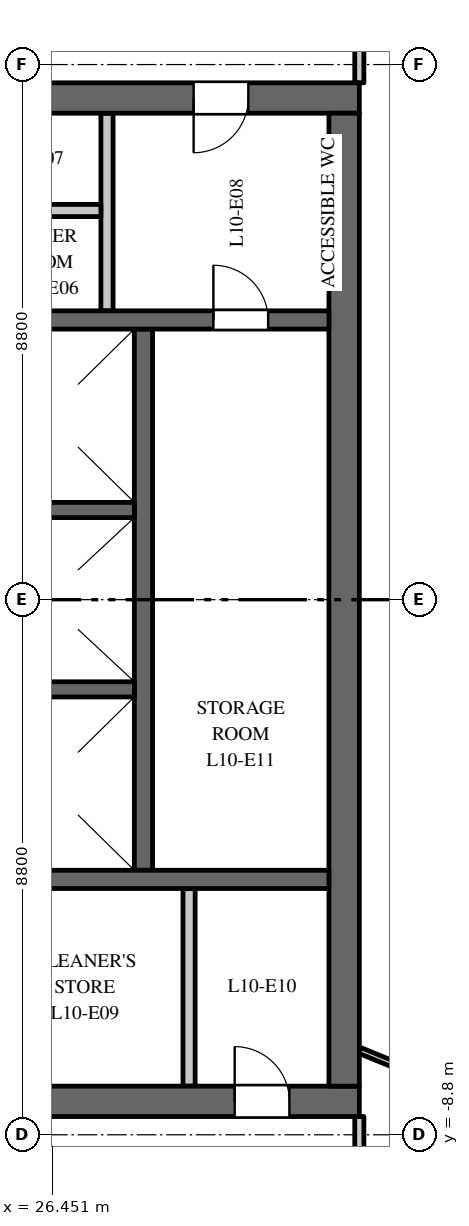
"""IFC4 building model, lengths in metres.
Left out: names, types, materials, properties, quantities, classifications, styles, units other than length and angle.
Written with IfcOpenShell. Run it as: python <this file> out.ifc"""

import sys

from ifc_helpers import new_model, si_unit, direction, frame, frame_2d, origin, place, context, subcontext, project, spatial, rectangle, extrude, element, fill, save


model = new_model("IFC4")
c1 = context("Model", 3, precision=1e-05, world=origin(), true_north=direction((0.0, 1.0)))
c2 = subcontext(c1, "Body", "Model", "MODEL_VIEW")
j1 = project(units=[si_unit("LENGTHUNIT", "METRE"), si_unit("PLANEANGLEUNIT", "RADIAN")], contexts=[c1])
p1 = place(None, origin())
s1 = spatial("IfcSite", under=j1, at=p1, CompositionType="ELEMENT")
p2 = place(p1, origin())
s2 = spatial("IfcBuilding", under=s1, at=p2, CompositionType="ELEMENT")
p3 = place(p2, frame((0.0, 0.0, 50.5)))
s3 = spatial("IfcBuildingStorey", under=s2, at=p3, CompositionType="ELEMENT", Elevation=50.5)
p4 = place(p3, frame((16.5, 8.25, 0.0), z_axis=(0.0, 0.0, 1.0), x_axis=(1.0, 0.0, 0.0)))
e1 = element("IfcWall", 1, at=p4, inside=s3, PredefinedType="SHEAR", context=c2, shape_type="SweptSolid", body=[
    extrude(rectangle(XDim=15.0, YDim=0.5, at=frame_2d((7.5, 0.0))), origin(), (0.0, 0.0, 1.0), 3.7),
])
p5 = place(p4, frame((6.9, 0.0, 0.0)))
e2 = element("IfcOpeningElement", 2, at=p5, cuts=e1, PredefinedType="OPENING", context=c2, shape_type="SweptSolid", body=[
    extrude(rectangle(XDim=1.2, YDim=2.1, at=frame_2d((0.6, 1.05))), frame((0.0, 0.26, 0.0), z_axis=(0.0, -1.0, 0.0), x_axis=(1.0, 0.0, 0.0)), (0.0, 0.0, 1.0), 0.52),
])
p6 = place(p4, frame((12.275, 0.0, 0.0)))
e3 = element("IfcOpeningElement", 3, at=p6, cuts=e1, PredefinedType="OPENING", context=c2, shape_type="SweptSolid", body=[
    extrude(rectangle(XDim=0.9, YDim=2.1, at=frame_2d((0.45, 1.05))), frame((0.0, 0.26, 0.0), z_axis=(0.0, -1.0, 0.0), x_axis=(1.0, 0.0, 0.0)), (0.0, 0.0, 1.0), 0.52),
])
p7 = place(p3, frame((16.5, -8.25, 0.0), z_axis=(0.0, 0.0, 1.0), x_axis=(1.0, 0.0, 0.0)))
e4 = element("IfcWall", 4, at=p7, inside=s3, PredefinedType="SHEAR", context=c2, shape_type="SweptSolid", body=[
    extrude(rectangle(XDim=15.0, YDim=0.5, at=frame_2d((7.5, 0.0))), origin(), (0.0, 0.0, 1.0), 3.7),
])
p8 = place(p7, frame((6.9, 0.0, 0.0)))
e5 = element("IfcOpeningElement", 5, at=p8, cuts=e4, PredefinedType="OPENING", context=c2, shape_type="SweptSolid", body=[
    extrude(rectangle(XDim=1.2, YDim=2.1, at=frame_2d((0.6, 1.05))), frame((0.0, 0.26, 0.0), z_axis=(0.0, -1.0, 0.0), x_axis=(1.0, 0.0, 0.0)), (0.0, 0.0, 1.0), 0.52),
])
p9 = place(p7, frame((12.95, 0.0, 0.0)))
e6 = element("IfcOpeningElement", 6, at=p9, cuts=e4, PredefinedType="OPENING", context=c2, shape_type="SweptSolid", body=[
    extrude(rectangle(XDim=0.9, YDim=2.1, at=frame_2d((0.45, 1.05))), frame((0.0, 0.26, 0.0), z_axis=(0.0, -1.0, 0.0), x_axis=(1.0, 0.0, 0.0)), (0.0, 0.0, 1.0), 0.52),
])
p10 = place(p3, frame((27.95, -4.45, 0.0), z_axis=(0.0, 0.0, 1.0), x_axis=(0.0, 1.0, 0.0)))
e7 = element("IfcWall", 7, at=p10, inside=s3, PredefinedType="SHEAR", context=c2, shape_type="SweptSolid", body=[
    extrude(rectangle(XDim=8.9, YDim=0.3, at=frame_2d((4.45, 0.0))), origin(), (0.0, 0.0, 1.0), 3.7),
])
p11 = place(p3, frame((31.25, -8.0, 0.0), z_axis=(0.0, 0.0, 1.0), x_axis=(0.0, 1.0, 0.0)))
e8 = element("IfcWall", 8, at=p11, inside=s3, PredefinedType="SHEAR", context=c2, shape_type="SweptSolid", body=[
    extrude(rectangle(XDim=16.0, YDim=0.5, at=frame_2d((8.0, 0.0))), origin(), (0.0, 0.0, 1.0), 3.7),
])
p12 = place(p3, frame((24.9, 4.6, 0.0), z_axis=(0.0, 0.0, 1.0), x_axis=(1.0, 0.0, 0.0)))
e9 = element("IfcWall", 9, at=p12, inside=s3, PredefinedType="SHEAR", context=c2, shape_type="SweptSolid", body=[
    extrude(rectangle(XDim=6.1, YDim=0.3, at=frame_2d((3.05, 0.0))), origin(), (0.0, 0.0, 1.0), 3.7),
])
p13 = place(p12, frame((4.2, 0.0, 0.0)))
e10 = element("IfcOpeningElement", 10, at=p13, cuts=e9, PredefinedType="OPENING", context=c2, shape_type="SweptSolid", body=[
    extrude(rectangle(XDim=0.9, YDim=2.1, at=frame_2d((0.45, 1.05))), frame((0.0, 0.16, 0.0), z_axis=(0.0, -1.0, 0.0), x_axis=(1.0, 0.0, 0.0)), (0.0, 0.0, 1.0), 0.32),
])
for number, where, z_axis, x_axis in (
    (11, (27.35, 4.75, 0.0), (0.0, 0.0, 1.0), (0.0, 1.0, 0.0)),
    (12, (28.7, -8.0, 0.0), (0.0, 0.0, 1.0), (0.0, 1.0, 0.0)),
):
    element("IfcWall", number, at=place(p3, frame(where, z_axis=z_axis, x_axis=x_axis)), inside=s3, PredefinedType="PARTITIONING", context=c2, shape_type="SweptSolid", body=[
        extrude(rectangle(XDim=3.25, YDim=0.2, at=frame_2d((1.625, 0.0))), origin(), (0.0, 0.0, 1.0), 3.7),
    ])
p14 = place(p3, frame((24.9, 6.4, 0.0), z_axis=(0.0, 0.0, 1.0), x_axis=(1.0, 0.0, 0.0)))
e13 = element("IfcWall", 13, at=p14, inside=s3, PredefinedType="PARTITIONING", context=c2, shape_type="SweptSolid", body=[
    extrude(rectangle(XDim=2.35, YDim=0.2, at=frame_2d((1.175, 0.0))), origin(), (0.0, 0.0, 1.0), 3.7),
])
p15 = place(p3, frame((24.9, -4.6, 0.0), z_axis=(0.0, 0.0, 1.0), x_axis=(1.0, 0.0, 0.0)))
e14 = element("IfcWall", 14, at=p15, inside=s3, PredefinedType="SHEAR", context=c2, shape_type="SweptSolid", body=[
    extrude(rectangle(XDim=6.1, YDim=0.3, at=frame_2d((3.05, 0.0))), origin(), (0.0, 0.0, 1.0), 3.7),
])
for number, where, z_axis, x_axis in (
    (15, (24.9, -1.475, 0.0), (0.0, 0.0, 1.0), (1.0, 0.0, 0.0)),
    (16, (24.9, 1.475, 0.0), (0.0, 0.0, 1.0), (1.0, 0.0, 0.0)),
):
    element("IfcWall", number, at=place(p3, frame(where, z_axis=z_axis, x_axis=x_axis)), inside=s3, PredefinedType="SHEAR", context=c2, shape_type="SweptSolid", body=[
        extrude(rectangle(XDim=2.9, YDim=0.25, at=frame_2d((1.45, 0.0))), origin(), (0.0, 0.0, 1.0), 3.7),
    ])
p16 = place(p3, frame((31.5, -10.7, 0.0), z_axis=(0.0, 0.0, 1.0), x_axis=(0.0, 1.0, 0.0)))
e17 = element("IfcWall", 17, at=p16, inside=s3, PredefinedType="PARTITIONING", context=c2, shape_type="SweptSolid", body=[
    extrude(rectangle(XDim=2.2, YDim=0.15, at=frame_2d((1.1, 0.0))), origin(), (0.0, 0.0, 1.0), 2.85),
])
p17 = place(p3, frame((31.5, -7.41, 0.0), z_axis=(0.0, 0.0, 1.0), x_axis=(0.925344112436, -0.379128307542, 0.0)))
e18 = element("IfcWall", 18, at=p17, inside=s3, PredefinedType="PARTITIONING", context=c2, shape_type="SweptSolid", body=[
    extrude(rectangle(XDim=2.954, YDim=0.1, at=frame_2d((1.477, 0.0))), origin(), (0.0, 0.0, 1.0), 3.7),
])
p18 = place(p3, frame((31.5, 8.5, 0.0), z_axis=(0.0, 0.0, 1.0), x_axis=(0.0, 1.0, 0.0)))
e19 = element("IfcWall", 19, at=p18, inside=s3, PredefinedType="PARTITIONING", context=c2, shape_type="SweptSolid", body=[
    extrude(rectangle(XDim=2.2, YDim=0.15, at=frame_2d((1.1, 0.0))), origin(), (0.0, 0.0, 1.0), 2.85),
])
p19 = place(p6, origin())
e20 = element("IfcDoor", 20, at=p19, inside=s3, OperationType="SINGLE_SWING_LEFT", PredefinedType="DOOR", context=c2, shape_type="SweptSolid", body=[
    extrude(rectangle(XDim=0.9, YDim=2.1, at=frame_2d((0.45, 1.05))), frame((0.0, 0.025, 0.0), z_axis=(0.0, -1.0, 0.0), x_axis=(1.0, 0.0, 0.0)), (0.0, 0.0, 1.0), 0.05),
])
fill(e3, e20)
p20 = place(p9, origin())
e21 = element("IfcDoor", 21, at=p20, inside=s3, OperationType="SINGLE_SWING_RIGHT", PredefinedType="DOOR", context=c2, shape_type="SweptSolid", body=[
    extrude(rectangle(XDim=0.9, YDim=2.1, at=frame_2d((0.45, 1.05))), frame((0.0, 0.025, 0.0), z_axis=(0.0, -1.0, 0.0), x_axis=(1.0, 0.0, 0.0)), (0.0, 0.0, 1.0), 0.05),
])
fill(e6, e21)
p21 = place(p13, origin())
e22 = element("IfcDoor", 22, at=p21, inside=s3, OperationType="SINGLE_SWING_RIGHT", PredefinedType="DOOR", context=c2, shape_type="SweptSolid", body=[
    extrude(rectangle(XDim=0.9, YDim=2.1, at=frame_2d((0.45, 1.05))), frame((0.0, 0.025, 0.0), z_axis=(0.0, -1.0, 0.0), x_axis=(1.0, 0.0, 0.0)), (0.0, 0.0, 1.0), 0.05),
])
fill(e10, e22)
save(model, sys.argv[1])
